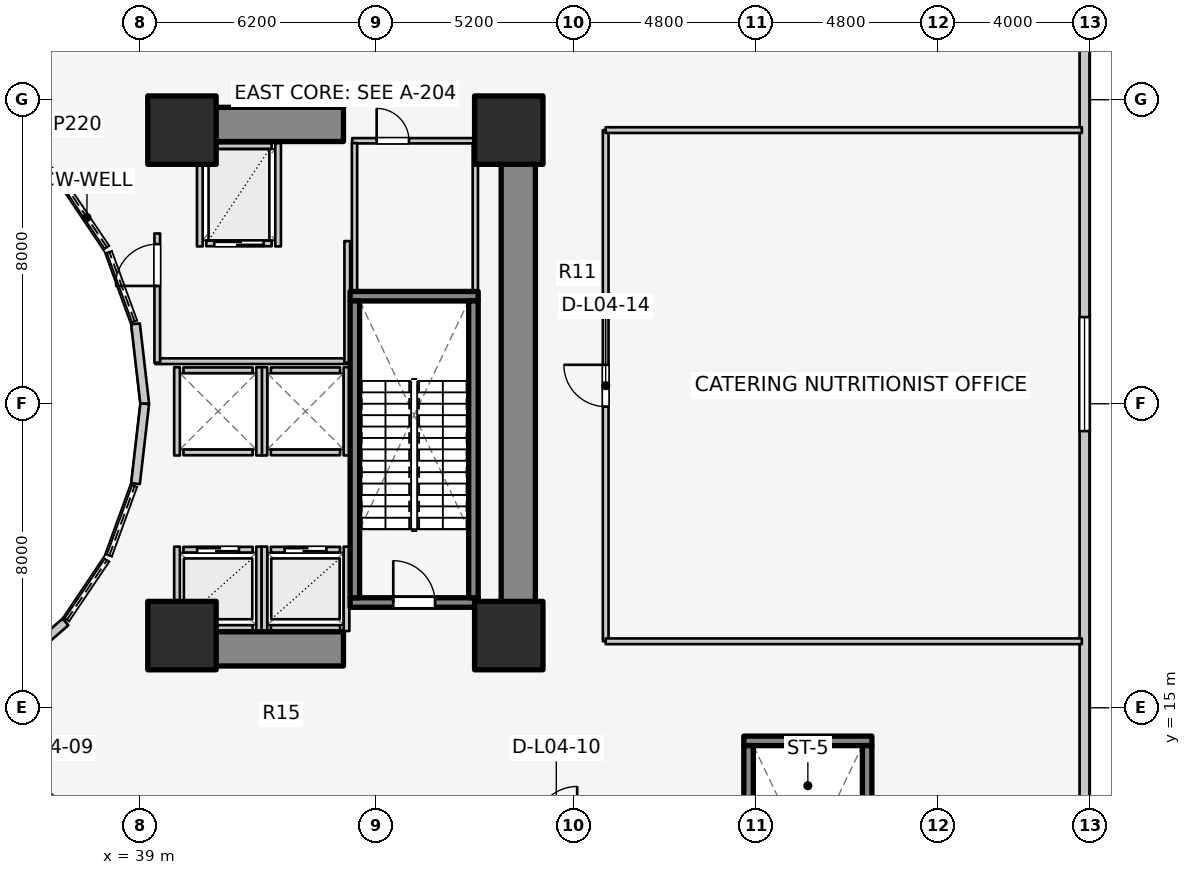
"""IFC4 building model, lengths in metres.
Left out: names, types, materials, properties, quantities, classifications, styles, units other than length and angle.
Written with IfcOpenShell. Run it as: python <this file> out.ifc"""

import sys

from ifc_helpers import new_model, si_unit, direction, frame, frame_2d, origin, origin_2d, place, context, subcontext, project, spatial, rectangle, extrude, element, fill, save


model = new_model("IFC4")
c1 = context("Model", 3, precision=1e-05, world=origin(), true_north=direction((0.0, 1.0)))
c2 = subcontext(c1, "Body", "Model", "MODEL_VIEW")
j1 = project(units=[si_unit("LENGTHUNIT", "METRE"), si_unit("PLANEANGLEUNIT", "RADIAN")], contexts=[c1])
p1 = place(None, origin())
s1 = spatial("IfcSite", under=j1, at=p1, CompositionType="ELEMENT")
p2 = place(p1, origin())
s2 = spatial("IfcBuilding", under=s1, at=p2, CompositionType="ELEMENT")
p3 = place(p2, frame((0.0, 0.0, 13.8)))
s3 = spatial("IfcBuildingStorey", under=s2, at=p3, CompositionType="ELEMENT", Elevation=13.8)
p4 = place(p3, frame((48.95, 17.05, 0.0), z_axis=(0.0, 0.0, 1.0), x_axis=(0.0, 1.0, 0.0)))
e1 = element("IfcWall", 1, at=p4, inside=s3, PredefinedType="SHEAR", context=c2, shape_type="SweptSolid", body=[
    extrude(rectangle(XDim=12.8, YDim=0.9, at=frame_2d((6.4, 0.0))), origin(), (0.0, 0.0, 1.0), 4.6),
])
for number, where, z_axis, x_axis in (
    (2, (39.85, 16.55, 0.0), (0.0, 0.0, 1.0), (1.0, 0.0, 0.0)),
    (3, (39.85, 30.35, 0.0), (0.0, 0.0, 1.0), (1.0, 0.0, 0.0)),
):
    element("IfcWall", number, at=place(p3, frame(where, z_axis=z_axis, x_axis=x_axis)), inside=s3, PredefinedType="SHEAR", context=c2, shape_type="SweptSolid", body=[
        extrude(rectangle(XDim=4.5, YDim=0.9, at=frame_2d((2.25, 0.0))), origin(), (0.0, 0.0, 1.0), 4.6),
    ])
p5 = place(p3, frame((44.525, 17.77, 0.0), z_axis=(0.0, 0.0, 1.0), x_axis=(1.0, 0.0, 0.0)))
e4 = element("IfcWall", 4, at=p5, inside=s3, PredefinedType="SOLIDWALL", context=c2, shape_type="SweptSolid", body=[
    extrude(rectangle(XDim=3.37, YDim=0.25, at=frame_2d((1.685, 0.0))), origin(), (0.0, 0.0, 1.0), 4.6),
])
p6 = place(p5, frame((1.135, 0.0, 0.0)))
e5 = element("IfcOpeningElement", 5, at=p6, cuts=e4, PredefinedType="OPENING", context=c2, shape_type="SweptSolid", body=[
    extrude(rectangle(XDim=1.1, YDim=2.1, at=frame_2d((0.55, 1.05))), frame((0.0, 0.135, 0.0), z_axis=(0.0, -1.0, 0.0), x_axis=(1.0, 0.0, 0.0)), (0.0, 0.0, 1.0), 0.27),
])
p7 = place(p3, frame((44.525, 25.83, 0.0), z_axis=(0.0, 0.0, 1.0), x_axis=(1.0, 0.0, 0.0)))
e6 = element("IfcWall", 6, at=p7, inside=s3, PredefinedType="SOLIDWALL", context=c2, shape_type="SweptSolid", body=[
    extrude(rectangle(XDim=3.37, YDim=0.25, at=frame_2d((1.685, 0.0))), origin(), (0.0, 0.0, 1.0), 4.6),
])
for number, where, z_axis, x_axis in (
    (7, (44.65, 17.895, 0.0), (0.0, 0.0, 1.0), (0.0, 1.0, 0.0)),
    (8, (47.77, 17.895, 0.0), (0.0, 0.0, 1.0), (0.0, 1.0, 0.0)),
):
    element("IfcWall", number, at=place(p3, frame(where, z_axis=z_axis, x_axis=x_axis)), inside=s3, PredefinedType="SOLIDWALL", context=c2, shape_type="SweptSolid", body=[
        extrude(rectangle(XDim=7.81, YDim=0.25, at=frame_2d((3.905, 0.0))), origin(), (0.0, 0.0, 1.0), 4.6),
    ])
p8 = place(p3, frame((54.885, 14.13, 0.0), z_axis=(0.0, 0.0, 1.0), x_axis=(1.0, 0.0, 0.0)))
e9 = element("IfcWall", 9, at=p8, inside=s3, PredefinedType="SOLIDWALL", context=c2, shape_type="SweptSolid", body=[
    extrude(rectangle(XDim=3.37, YDim=0.25, at=frame_2d((1.685, 0.0))), origin(), (0.0, 0.0, 1.0), 4.6),
])
for number, where, z_axis, x_axis in (
    (10, (55.01, 6.195, 0.0), (0.0, 0.0, 1.0), (0.0, 1.0, 0.0)),
    (11, (58.13, 6.195, 0.0), (0.0, 0.0, 1.0), (0.0, 1.0, 0.0)),
):
    element("IfcWall", number, at=place(p3, frame(where, z_axis=z_axis, x_axis=x_axis)), inside=s3, PredefinedType="SOLIDWALL", context=c2, shape_type="SweptSolid", body=[
        extrude(rectangle(XDim=7.81, YDim=0.25, at=frame_2d((3.905, 0.0))), origin(), (0.0, 0.0, 1.0), 4.6),
    ])
for number, where, z_axis, x_axis in (
    (12, (40.1, 16.9, 0.0), (0.0, 0.0, 1.0), (1.0, 0.0, 0.0)),
    (13, (48.7, 16.9, 0.0), (0.0, 0.0, 1.0), (1.0, 0.0, 0.0)),
    (14, (48.7, 30.2, 0.0), (0.0, 0.0, 1.0), (1.0, 0.0, 0.0)),
    (15, (40.1, 30.2, 0.0), (0.0, 0.0, 1.0), (1.0, 0.0, 0.0)),
):
    element("IfcColumn", number, at=place(p3, frame(where, z_axis=z_axis, x_axis=x_axis)), inside=s3, PredefinedType="COLUMN", context=c2, shape_type="SweptSolid", body=[
        extrude(rectangle(XDim=1.8, YDim=1.8, at=origin_2d()), origin(), (0.0, 0.0, 1.0), 4.6),
    ])
p9 = place(p3, frame((63.85, 0.28, 0.0), z_axis=(0.0, 0.0, 1.0), x_axis=(0.0, 1.0, 0.0)))
e16 = element("IfcWall", 16, at=p9, inside=s3, PredefinedType="STANDARD", context=c2, shape_type="SweptSolid", body=[
    extrude(rectangle(XDim=45.44, YDim=0.26, at=frame_2d((22.72, 0.0))), origin(), (0.0, 0.0, 1.0), 4.28),
])
p10 = place(p9, frame((6.0, 0.0, 0.9)))
e17 = element("IfcOpeningElement", 17, at=p10, cuts=e16, PredefinedType="OPENING", context=c2, shape_type="SweptSolid", body=[
    extrude(rectangle(XDim=3.0, YDim=2.4, at=frame_2d((1.5, 1.2))), frame((0.0, 0.14, 0.0), z_axis=(0.0, -1.0, 0.0), x_axis=(1.0, 0.0, 0.0)), (0.0, 0.0, 1.0), 0.28),
])
p11 = place(p9, frame((22.0, 0.0, 0.9)))
e18 = element("IfcOpeningElement", 18, at=p11, cuts=e16, PredefinedType="OPENING", context=c2, shape_type="SweptSolid", body=[
    extrude(rectangle(XDim=3.0, YDim=2.4, at=frame_2d((1.5, 1.2))), frame((0.0, 0.14, 0.0), z_axis=(0.0, -1.0, 0.0), x_axis=(1.0, 0.0, 0.0)), (0.0, 0.0, 1.0), 0.28),
])
p12 = place(p9, frame((38.0, 0.0, 0.9)))
e19 = element("IfcOpeningElement", 19, at=p12, cuts=e16, PredefinedType="OPENING", context=c2, shape_type="SweptSolid", body=[
    extrude(rectangle(XDim=3.0, YDim=2.4, at=frame_2d((1.5, 1.2))), frame((0.0, 0.14, 0.0), z_axis=(0.0, -1.0, 0.0), x_axis=(1.0, 0.0, 0.0)), (0.0, 0.0, 1.0), 0.28),
])
p13 = place(p3, frame((39.12, 23.0, 0.0), z_axis=(0.0, 0.0, 1.0), x_axis=(-0.114711713601, 0.993398823617, 0.0)))
e20 = element("IfcWall", 20, at=p13, inside=s3, PredefinedType="STANDARD", context=c2, shape_type="SweptSolid", body=[
    extrude(rectangle(XDim=2.115, YDim=0.23, at=frame_2d((1.058, 0.0))), origin(), (0.0, 0.0, 1.0), 3.28),
])
for number, where, z_axis, x_axis in (
    (21, (37.035, 28.742, 0.0), (0.0, 0.0, 1.0), (-0.753, 0.659, 0.0)),
    (22, (35.56, 15.968, 0.0), (0.0, 0.0, 1.0), (0.753, 0.659, 0.0)),
):
    element("IfcWall", number, at=place(p3, frame(where, z_axis=z_axis, x_axis=x_axis)), inside=s3, PredefinedType="STANDARD", context=c2, shape_type="SweptSolid", body=[
        extrude(rectangle(XDim=1.959, YDim=0.23, at=frame_2d((0.98, 0.0))), origin(), (0.0, 0.0, 1.0), 3.28),
    ])
p14 = place(p3, frame((38.877, 20.898, 0.0), z_axis=(0.0, 0.0, 1.0), x_axis=(0.114711713601, 0.993398823617, 0.0)))
e23 = element("IfcWall", 23, at=p14, inside=s3, PredefinedType="STANDARD", context=c2, shape_type="SweptSolid", body=[
    extrude(rectangle(XDim=2.115, YDim=0.23, at=frame_2d((1.058, 0.0))), origin(), (0.0, 0.0, 1.0), 3.28),
])
p15 = place(p3, frame((40.14, 19.16, 0.0), z_axis=(0.0, 0.0, 1.0), x_axis=(1.0, 0.0, 0.0)))
e24 = element("IfcWall", 24, at=p15, inside=s3, PredefinedType="SOLIDWALL", context=c2, shape_type="SweptSolid", body=[
    extrude(rectangle(XDim=1.82, YDim=0.15, at=frame_2d((0.91, 0.0))), origin(), (0.0, 0.0, 1.0), 3.62),
])
p16 = place(p15, frame((0.36, 0.0, 0.0)))
e25 = element("IfcOpeningElement", 25, at=p16, cuts=e24, PredefinedType="OPENING", context=c2, shape_type="SweptSolid", body=[
    extrude(rectangle(XDim=1.1, YDim=2.1, at=frame_2d((0.55, 1.05))), frame((0.0, 0.085, 0.0), z_axis=(0.0, -1.0, 0.0), x_axis=(1.0, 0.0, 0.0)), (0.0, 0.0, 1.0), 0.17),
])
p17 = place(p3, frame((40.14, 17.1, 0.0), z_axis=(0.0, 0.0, 1.0), x_axis=(1.0, 0.0, 0.0)))
e26 = element("IfcWall", 26, at=p17, inside=s3, PredefinedType="SOLIDWALL", context=c2, shape_type="SweptSolid", body=[
    extrude(rectangle(XDim=1.82, YDim=0.15, at=frame_2d((0.91, 0.0))), origin(), (0.0, 0.0, 1.0), 3.62),
])
p18 = place(p3, frame((39.97, 17.02, 0.0), z_axis=(0.0, 0.0, 1.0), x_axis=(0.0, 1.0, 0.0)))
e27 = element("IfcWall", 27, at=p18, inside=s3, PredefinedType="SOLIDWALL", context=c2, shape_type="SweptSolid", body=[
    extrude(rectangle(XDim=2.22, YDim=0.15, at=frame_2d((1.11, 0.0))), origin(), (0.0, 0.0, 1.0), 3.3),
])
p19 = place(p3, frame((42.13, 17.02, 0.0), z_axis=(0.0, 0.0, 1.0), x_axis=(0.0, 1.0, 0.0)))
e28 = element("IfcWall", 28, at=p19, inside=s3, PredefinedType="SOLIDWALL", context=c2, shape_type="SweptSolid", body=[
    extrude(rectangle(XDim=2.22, YDim=0.15, at=frame_2d((1.11, 0.0))), origin(), (0.0, 0.0, 1.0), 4.255),
])
p20 = place(p3, frame((42.44, 19.16, 0.0), z_axis=(0.0, 0.0, 1.0), x_axis=(1.0, 0.0, 0.0)))
e29 = element("IfcWall", 29, at=p20, inside=s3, PredefinedType="SOLIDWALL", context=c2, shape_type="SweptSolid", body=[
    extrude(rectangle(XDim=1.82, YDim=0.15, at=frame_2d((0.91, 0.0))), origin(), (0.0, 0.0, 1.0), 4.255),
])
p21 = place(p20, frame((0.36, 0.0, 0.0)))
e30 = element("IfcOpeningElement", 30, at=p21, cuts=e29, PredefinedType="OPENING", context=c2, shape_type="SweptSolid", body=[
    extrude(rectangle(XDim=1.1, YDim=2.1, at=frame_2d((0.55, 1.05))), frame((0.0, 0.085, 0.0), z_axis=(0.0, -1.0, 0.0), x_axis=(1.0, 0.0, 0.0)), (0.0, 0.0, 1.0), 0.17),
])
p22 = place(p3, frame((42.44, 17.1, 0.0), z_axis=(0.0, 0.0, 1.0), x_axis=(1.0, 0.0, 0.0)))
e31 = element("IfcWall", 31, at=p22, inside=s3, PredefinedType="SOLIDWALL", context=c2, shape_type="SweptSolid", body=[
    extrude(rectangle(XDim=1.82, YDim=0.15, at=frame_2d((0.91, 0.0))), origin(), (0.0, 0.0, 1.0), 4.255),
])
p23 = place(p3, frame((42.27, 17.02, 0.0), z_axis=(0.0, 0.0, 1.0), x_axis=(0.0, 1.0, 0.0)))
e32 = element("IfcWall", 32, at=p23, inside=s3, PredefinedType="SOLIDWALL", context=c2, shape_type="SweptSolid", body=[
    extrude(rectangle(XDim=2.22, YDim=0.15, at=frame_2d((1.11, 0.0))), origin(), (0.0, 0.0, 1.0), 4.255),
])
p24 = place(p3, frame((44.43, 17.02, 0.0), z_axis=(0.0, 0.0, 1.0), x_axis=(0.0, 1.0, 0.0)))
e33 = element("IfcWall", 33, at=p24, inside=s3, PredefinedType="SOLIDWALL", context=c2, shape_type="SweptSolid", body=[
    extrude(rectangle(XDim=2.22, YDim=0.15, at=frame_2d((1.11, 0.0))), origin(), (0.0, 0.0, 1.0), 3.62),
])
for number, where, z_axis, x_axis in (
    (34, (42.44, 21.72, 0.0), (0.0, 0.0, 1.0), (1.0, 0.0, 0.0)),
    (35, (42.44, 23.88, 0.0), (0.0, 0.0, 1.0), (1.0, 0.0, 0.0)),
):
    element("IfcWall", number, at=place(p3, frame(where, z_axis=z_axis, x_axis=x_axis)), inside=s3, PredefinedType="SOLIDWALL", context=c2, shape_type="SweptSolid", body=[
        extrude(rectangle(XDim=1.82, YDim=0.15, at=frame_2d((0.91, 0.0))), origin(), (0.0, 0.0, 1.0), 4.255),
    ])
for number, where, z_axis, x_axis in (
    (36, (42.27, 21.64, 0.0), (0.0, 0.0, 1.0), (0.0, 1.0, 0.0)),
    (37, (44.43, 21.64, 0.0), (0.0, 0.0, 1.0), (0.0, 1.0, 0.0)),
):
    element("IfcWall", number, at=place(p3, frame(where, z_axis=z_axis, x_axis=x_axis)), inside=s3, PredefinedType="SOLIDWALL", context=c2, shape_type="SweptSolid", body=[
        extrude(rectangle(XDim=2.32, YDim=0.15, at=frame_2d((1.16, 0.0))), origin(), (0.0, 0.0, 1.0), 4.255),
    ])
for number, where, z_axis, x_axis in (
    (38, (40.14, 21.72, 0.0), (0.0, 0.0, 1.0), (1.0, 0.0, 0.0)),
    (39, (40.14, 23.88, 0.0), (0.0, 0.0, 1.0), (1.0, 0.0, 0.0)),
):
    element("IfcWall", number, at=place(p3, frame(where, z_axis=z_axis, x_axis=x_axis)), inside=s3, PredefinedType="SOLIDWALL", context=c2, shape_type="SweptSolid", body=[
        extrude(rectangle(XDim=1.82, YDim=0.15, at=frame_2d((0.91, 0.0))), origin(), (0.0, 0.0, 1.0), 3.62),
    ])
p25 = place(p3, frame((39.97, 21.64, 0.0), z_axis=(0.0, 0.0, 1.0), x_axis=(0.0, 1.0, 0.0)))
e40 = element("IfcWall", 40, at=p25, inside=s3, PredefinedType="SOLIDWALL", context=c2, shape_type="SweptSolid", body=[
    extrude(rectangle(XDim=2.32, YDim=0.15, at=frame_2d((1.16, 0.0))), origin(), (0.0, 0.0, 1.0), 3.62),
])
p26 = place(p3, frame((42.13, 21.64, 0.0), z_axis=(0.0, 0.0, 1.0), x_axis=(0.0, 1.0, 0.0)))
e41 = element("IfcWall", 41, at=p26, inside=s3, PredefinedType="SOLIDWALL", context=c2, shape_type="SweptSolid", body=[
    extrude(rectangle(XDim=2.32, YDim=0.15, at=frame_2d((1.16, 0.0))), origin(), (0.0, 0.0, 1.0), 4.255),
])
p27 = place(p3, frame((40.74, 27.22, 0.0), z_axis=(0.0, 0.0, 1.0), x_axis=(1.0, 0.0, 0.0)))
e42 = element("IfcWall", 42, at=p27, inside=s3, PredefinedType="SOLIDWALL", context=c2, shape_type="SweptSolid", body=[
    extrude(rectangle(XDim=1.72, YDim=0.15, at=frame_2d((0.86, 0.0))), origin(), (0.0, 0.0, 1.0), 4.255),
])
p28 = place(p27, frame((0.21, 0.0, 0.0)))
e43 = element("IfcOpeningElement", 43, at=p28, cuts=e42, PredefinedType="OPENING", context=c2, shape_type="SweptSolid", body=[
    extrude(rectangle(XDim=1.3, YDim=2.1, at=frame_2d((0.65, 1.05))), frame((0.0, 0.085, 0.0), z_axis=(0.0, -1.0, 0.0), x_axis=(1.0, 0.0, 0.0)), (0.0, 0.0, 1.0), 0.17),
])
p29 = place(p3, frame((40.74, 29.78, 0.0), z_axis=(0.0, 0.0, 1.0), x_axis=(1.0, 0.0, 0.0)))
e44 = element("IfcWall", 44, at=p29, inside=s3, PredefinedType="SOLIDWALL", context=c2, shape_type="SweptSolid", body=[
    extrude(rectangle(XDim=1.72, YDim=0.15, at=frame_2d((0.86, 0.0))), origin(), (0.0, 0.0, 1.0), 4.255),
])
for number, where, z_axis, x_axis in (
    (45, (40.57, 27.14, 0.0), (0.0, 0.0, 1.0), (0.0, 1.0, 0.0)),
    (46, (42.63, 27.14, 0.0), (0.0, 0.0, 1.0), (0.0, 1.0, 0.0)),
):
    element("IfcWall", number, at=place(p3, frame(where, z_axis=z_axis, x_axis=x_axis)), inside=s3, PredefinedType="SOLIDWALL", context=c2, shape_type="SweptSolid", body=[
        extrude(rectangle(XDim=2.72, YDim=0.15, at=frame_2d((1.36, 0.0))), origin(), (0.0, 0.0, 1.0), 4.255),
    ])
p30 = place(p3, frame((39.4, 24.12, 0.0), z_axis=(0.0, 0.0, 1.0), x_axis=(1.0, 0.0, 0.0)))
e47 = element("IfcWall", 47, at=p30, inside=s3, PredefinedType="PARTITIONING", context=c2, shape_type="SweptSolid", body=[
    extrude(rectangle(XDim=5.08, YDim=0.15, at=frame_2d((2.54, 0.0))), origin(), (0.0, 0.0, 1.0), 3.62),
])
p31 = place(p3, frame((44.45, 24.08, 0.0), z_axis=(0.0, 0.0, 1.0), x_axis=(0.0, 1.0, 0.0)))
e48 = element("IfcWall", 48, at=p31, inside=s3, PredefinedType="PARTITIONING", context=c2, shape_type="SweptSolid", body=[
    extrude(rectangle(XDim=3.2, YDim=0.15, at=frame_2d((1.6, 0.0))), origin(), (0.0, 0.0, 1.0), 4.255),
])
p32 = place(p3, frame((39.45, 24.08, 0.0), z_axis=(0.0, 0.0, 1.0), x_axis=(0.0, 1.0, 0.0)))
e49 = element("IfcWall", 49, at=p32, inside=s3, PredefinedType="PARTITIONING", context=c2, shape_type="SweptSolid", body=[
    extrude(rectangle(XDim=3.4, YDim=0.15, at=frame_2d((1.7, 0.0))), origin(), (0.0, 0.0, 1.0), 4.255),
])
p33 = place(p32, frame((2.02, 0.0, 0.0)))
e50 = element("IfcOpeningElement", 50, at=p33, cuts=e49, PredefinedType="OPENING", context=c2, shape_type="SweptSolid", body=[
    extrude(rectangle(XDim=1.1, YDim=2.1, at=frame_2d((0.55, 1.05))), frame((0.0, 0.085, 0.0), z_axis=(0.0, -1.0, 0.0), x_axis=(1.0, 0.0, 0.0)), (0.0, 0.0, 1.0), 0.17),
])
p34 = place(p3, frame((51.25, 16.75, 0.0), z_axis=(0.0, 0.0, 1.0), x_axis=(0.0, 1.0, 0.0)))
e51 = element("IfcWall", 51, at=p34, inside=s3, PredefinedType="PARTITIONING", context=c2, shape_type="SweptSolid", body=[
    extrude(rectangle(XDim=13.45, YDim=0.15, at=frame_2d((6.725, 0.0))), origin(), (0.0, 0.0, 1.0), 4.255),
])
p35 = place(p34, frame((6.175, 0.0, 0.0)))
e52 = element("IfcOpeningElement", 52, at=p35, cuts=e51, PredefinedType="OPENING", context=c2, shape_type="SweptSolid", body=[
    extrude(rectangle(XDim=1.1, YDim=2.1, at=frame_2d((0.55, 1.05))), frame((0.0, 0.085, 0.0), z_axis=(0.0, -1.0, 0.0), x_axis=(1.0, 0.0, 0.0)), (0.0, 0.0, 1.0), 0.17),
])
for number, where, z_axis, x_axis in (
    (53, (51.25, 16.75, 0.0), (0.0, 0.0, 1.0), (1.0, 0.0, 0.0)),
    (54, (51.25, 30.2, 0.0), (0.0, 0.0, 1.0), (1.0, 0.0, 0.0)),
):
    element("IfcWall", number, at=place(p3, frame(where, z_axis=z_axis, x_axis=x_axis)), inside=s3, PredefinedType="PARTITIONING", context=c2, shape_type="SweptSolid", body=[
        extrude(rectangle(XDim=12.53, YDim=0.15, at=frame_2d((6.265, 0.0))), origin(), (0.0, 0.0, 1.0), 3.3),
    ])
p36 = place(p3, frame((44.58, 29.92, 0.0), z_axis=(0.0, 0.0, 1.0), x_axis=(1.0, 0.0, 0.0)))
e55 = element("IfcWall", 55, at=p36, inside=s3, PredefinedType="PLUMBINGWALL", context=c2, shape_type="SweptSolid", body=[
    extrude(rectangle(XDim=3.3, YDim=0.14, at=frame_2d((1.65, 0.0))), origin(), (0.0, 0.0, 1.0), 4.255),
])
p37 = place(p36, frame((0.643, 0.0, 0.0)))
e56 = element("IfcOpeningElement", 56, at=p37, cuts=e55, PredefinedType="OPENING", context=c2, shape_type="SweptSolid", body=[
    extrude(rectangle(XDim=0.85, YDim=2.05, at=frame_2d((0.425, 1.025))), frame((0.0, 0.08, 0.0), z_axis=(0.0, -1.0, 0.0), x_axis=(1.0, 0.0, 0.0)), (0.0, 0.0, 1.0), 0.16),
])
for number, where, z_axis, x_axis in (
    (57, (44.64, 25.98, 0.0), (0.0, 0.0, 1.0), (0.0, 1.0, 0.0)),
    (58, (47.82, 25.98, 0.0), (0.0, 0.0, 1.0), (0.0, 1.0, 0.0)),
):
    element("IfcWall", number, at=place(p3, frame(where, z_axis=z_axis, x_axis=x_axis)), inside=s3, PredefinedType="PLUMBINGWALL", context=c2, shape_type="SweptSolid", body=[
        extrude(rectangle(XDim=3.88, YDim=0.14, at=frame_2d((1.94, 0.0))), origin(), (0.0, 0.0, 1.0), 4.255),
    ])
p38 = place(p11, origin())
e59 = element("IfcWindow", 59, at=p38, inside=s3, PartitioningType="SINGLE_PANEL", PredefinedType="WINDOW", context=c2, shape_type="SweptSolid", body=[
    extrude(rectangle(XDim=3.0, YDim=2.4, at=frame_2d((1.5, 1.2))), frame((0.0, 0.03, 0.0), z_axis=(0.0, -1.0, 0.0), x_axis=(1.0, 0.0, 0.0)), (0.0, 0.0, 1.0), 0.06),
])
fill(e18, e59)
p39 = place(p6, origin())
e60 = element("IfcDoor", 60, at=p39, inside=s3, OperationType="SINGLE_SWING_LEFT", PredefinedType="DOOR", context=c2, shape_type="SweptSolid", body=[
    extrude(rectangle(XDim=1.1, YDim=2.1, at=frame_2d((0.55, 1.05))), frame((0.0, 0.025, 0.0), z_axis=(0.0, -1.0, 0.0), x_axis=(1.0, 0.0, 0.0)), (0.0, 0.0, 1.0), 0.05),
])
fill(e5, e60)
p40 = place(p16, origin())
e61 = element("IfcDoor", 61, at=p40, inside=s3, OperationType="DOUBLE_DOOR_SLIDING", PredefinedType="DOOR", context=c2, shape_type="SweptSolid", body=[
    extrude(rectangle(XDim=1.1, YDim=2.1, at=frame_2d((0.55, 1.05))), frame((0.0, 0.025, 0.0), z_axis=(0.0, -1.0, 0.0), x_axis=(1.0, 0.0, 0.0)), (0.0, 0.0, 1.0), 0.05),
])
fill(e25, e61)
p41 = place(p21, origin())
e62 = element("IfcDoor", 62, at=p41, inside=s3, OperationType="DOUBLE_DOOR_SLIDING", PredefinedType="DOOR", context=c2, shape_type="SweptSolid", body=[
    extrude(rectangle(XDim=1.1, YDim=2.1, at=frame_2d((0.55, 1.05))), frame((0.0, 0.025, 0.0), z_axis=(0.0, -1.0, 0.0), x_axis=(1.0, 0.0, 0.0)), (0.0, 0.0, 1.0), 0.05),
])
fill(e30, e62)
p42 = place(p28, origin())
e63 = element("IfcDoor", 63, at=p42, inside=s3, OperationType="DOUBLE_DOOR_SLIDING", PredefinedType="DOOR", context=c2, shape_type="SweptSolid", body=[
    extrude(rectangle(XDim=1.3, YDim=2.1, at=frame_2d((0.65, 1.05))), frame((0.0, 0.025, 0.0), z_axis=(0.0, -1.0, 0.0), x_axis=(1.0, 0.0, 0.0)), (0.0, 0.0, 1.0), 0.05),
])
fill(e43, e63)
p43 = place(p33, origin())
e64 = element("IfcDoor", 64, at=p43, inside=s3, OperationType="SINGLE_SWING_LEFT", PredefinedType="DOOR", context=c2, shape_type="SweptSolid", body=[
    extrude(rectangle(XDim=1.1, YDim=2.1, at=frame_2d((0.55, 1.05))), frame((0.0, 0.025, 0.0), z_axis=(0.0, -1.0, 0.0), x_axis=(1.0, 0.0, 0.0)), (0.0, 0.0, 1.0), 0.05),
])
fill(e50, e64)
p44 = place(p35, origin())
e65 = element("IfcDoor", 65, at=p44, inside=s3, OperationType="SINGLE_SWING_RIGHT", PredefinedType="DOOR", context=c2, shape_type="SweptSolid", body=[
    extrude(rectangle(XDim=1.1, YDim=2.1, at=frame_2d((0.55, 1.05))), frame((0.0, 0.025, 0.0), z_axis=(0.0, -1.0, 0.0), x_axis=(1.0, 0.0, 0.0)), (0.0, 0.0, 1.0), 0.05),
])
fill(e52, e65)
p45 = place(p37, origin())
e66 = element("IfcDoor", 66, at=p45, inside=s3, OperationType="SINGLE_SWING_LEFT", PredefinedType="DOOR", context=c2, shape_type="SweptSolid", body=[
    extrude(rectangle(XDim=0.85, YDim=2.05, at=frame_2d((0.425, 1.025))), frame((0.0, 0.025, 0.0), z_axis=(0.0, -1.0, 0.0), x_axis=(1.0, 0.0, 0.0)), (0.0, 0.0, 1.0), 0.05),
])
fill(e56, e66)
save(model, sys.argv[1])
